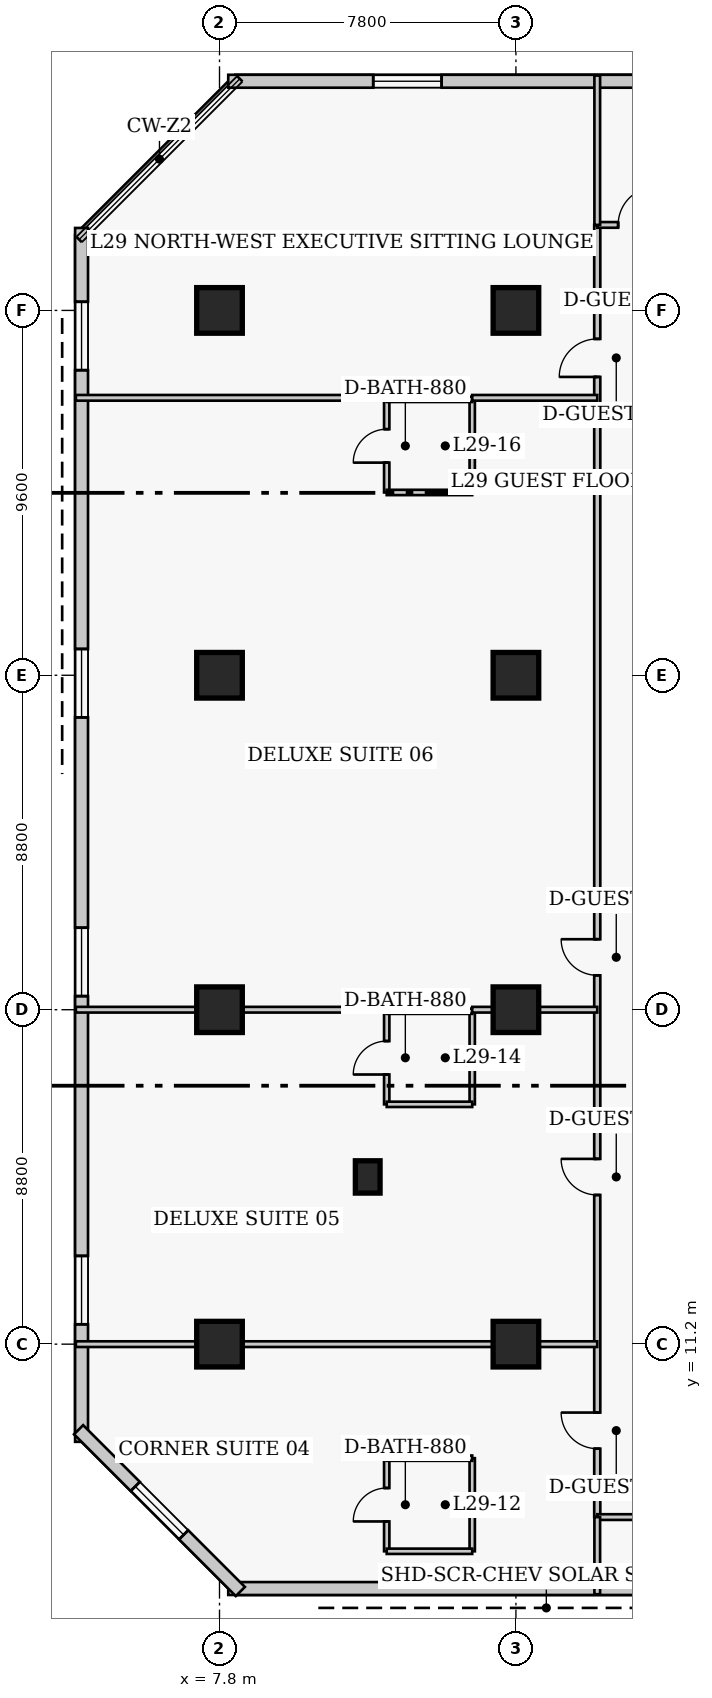
"""IFC4 building model, lengths in metres.
Left out: names, types, materials, properties, quantities, classifications, styles, units other than length and angle.
Written with IfcOpenShell. Run it as: python <this file> out.ifc"""

import sys

from ifc_helpers import new_model, si_unit, direction, frame, frame_2d, origin, origin_2d, place, context, subcontext, project, spatial, rectangle, extrude, element, fill, save


model = new_model("IFC4")
c1 = context("Model", 3, precision=1e-05, world=origin(), true_north=direction((0.0, 1.0)))
c2 = subcontext(c1, "Body", "Model", "MODEL_VIEW")
j1 = project(units=[si_unit("LENGTHUNIT", "METRE"), si_unit("PLANEANGLEUNIT", "RADIAN")], contexts=[c1])
p1 = place(None, origin())
s1 = spatial("IfcSite", under=j1, at=p1, CompositionType="ELEMENT")
p2 = place(p1, origin())
s2 = spatial("IfcBuilding", under=s1, at=p2, CompositionType="ELEMENT")
p3 = place(p2, frame((0.0, 0.0, 118.4)))
s3 = spatial("IfcBuildingStorey", under=s2, at=p3, CompositionType="ELEMENT", Elevation=118.4)
for number, where, z_axis, x_axis in (
    (1, (7.8, 11.2, 0.0), (0.0, 0.0, 1.0), (1.0, 0.0, 0.0)),
    (2, (7.8, 20.0, 0.0), (0.0, 0.0, 1.0), (1.0, 0.0, 0.0)),
    (3, (7.8, 28.8, 0.0), (0.0, 0.0, 1.0), (1.0, 0.0, 0.0)),
    (4, (7.8, 38.4, 0.0), (0.0, 0.0, 1.0), (1.0, 0.0, 0.0)),
    (5, (15.6, 11.2, 0.0), (0.0, 0.0, 1.0), (1.0, 0.0, 0.0)),
    (6, (15.6, 20.0, 0.0), (0.0, 0.0, 1.0), (1.0, 0.0, 0.0)),
    (7, (15.6, 28.8, 0.0), (0.0, 0.0, 1.0), (1.0, 0.0, 0.0)),
    (8, (15.6, 38.4, 0.0), (0.0, 0.0, 1.0), (1.0, 0.0, 0.0)),
):
    element("IfcColumn", number, at=place(p3, frame(where, z_axis=z_axis, x_axis=x_axis)), inside=s3, PredefinedType="COLUMN", context=c2, shape_type="SweptSolid", body=[
        extrude(rectangle(XDim=1.2, YDim=1.2, at=origin_2d()), origin(), (0.0, 0.0, 1.0), 3.8),
    ])
p4 = place(p3, frame((11.7, 15.6, 0.0), z_axis=(0.0, 0.0, 1.0), x_axis=(1.0, 0.0, 0.0)))
e9 = element("IfcColumn", 9, at=p4, inside=s3, PredefinedType="PILASTER", context=c2, shape_type="SweptSolid", body=[
    extrude(rectangle(XDim=0.65, YDim=0.85, at=origin_2d()), origin(), (0.0, 0.0, 1.0), 3.8),
])
p5 = place(p3, frame((8.03, 4.77, 0.0), z_axis=(0.0, 0.0, 1.0), x_axis=(1.0, 0.0, 0.0)))
e10 = element("IfcWall", 10, at=p5, inside=s3, PredefinedType="SOLIDWALL", context=c2, shape_type="SweptSolid", body=[
    extrude(rectangle(XDim=28.29, YDim=0.34, at=frame_2d((14.145, 0.0))), origin(), (0.0, 0.0, 1.0), 3.54),
])
p6 = place(p5, frame((12.595, 0.0, 0.85)))
e11 = element("IfcOpeningElement", 11, at=p6, cuts=e10, PredefinedType="OPENING", context=c2, shape_type="SweptSolid", body=[
    extrude(rectangle(XDim=1.8, YDim=1.8, at=frame_2d((0.9, 0.9))), frame((0.0, 0.18, 0.0), z_axis=(0.0, -1.0, 0.0), x_axis=(1.0, 0.0, 0.0)), (0.0, 0.0, 1.0), 0.36),
])
p7 = place(p3, frame((36.32, 44.43, 0.0), z_axis=(0.0, 0.0, 1.0), x_axis=(-1.0, 0.0, 0.0)))
e12 = element("IfcWall", 12, at=p7, inside=s3, PredefinedType="SOLIDWALL", context=c2, shape_type="SweptSolid", body=[
    extrude(rectangle(XDim=28.29, YDim=0.34, at=frame_2d((14.145, 0.0))), origin(), (0.0, 0.0, 1.0), 3.54),
])
p8 = place(p7, frame((3.815, 0.0, 0.85)))
e13 = element("IfcOpeningElement", 13, at=p8, cuts=e12, PredefinedType="OPENING", context=c2, shape_type="SweptSolid", body=[
    extrude(rectangle(XDim=1.8, YDim=1.8, at=frame_2d((0.9, 0.9))), frame((0.0, 0.18, 0.0), z_axis=(0.0, -1.0, 0.0), x_axis=(1.0, 0.0, 0.0)), (0.0, 0.0, 1.0), 0.36),
])
p9 = place(p7, frame((13.245, 0.0, 0.85)))
e14 = element("IfcOpeningElement", 14, at=p9, cuts=e12, PredefinedType="OPENING", context=c2, shape_type="SweptSolid", body=[
    extrude(rectangle(XDim=1.8, YDim=1.8, at=frame_2d((0.9, 0.9))), frame((0.0, 0.18, 0.0), z_axis=(0.0, -1.0, 0.0), x_axis=(1.0, 0.0, 0.0)), (0.0, 0.0, 1.0), 0.36),
])
p10 = place(p7, frame((22.675, 0.0, 0.85)))
e15 = element("IfcOpeningElement", 15, at=p10, cuts=e12, PredefinedType="OPENING", context=c2, shape_type="SweptSolid", body=[
    extrude(rectangle(XDim=1.8, YDim=1.8, at=frame_2d((0.9, 0.9))), frame((0.0, 0.18, 0.0), z_axis=(0.0, -1.0, 0.0), x_axis=(1.0, 0.0, 0.0)), (0.0, 0.0, 1.0), 0.36),
])
p11 = place(p3, frame((4.17, 40.57, 0.0), z_axis=(0.0, 0.0, 1.0), x_axis=(0.0, -1.0, 0.0)))
e16 = element("IfcWall", 16, at=p11, inside=s3, PredefinedType="SOLIDWALL", context=c2, shape_type="SweptSolid", body=[
    extrude(rectangle(XDim=31.94, YDim=0.34, at=frame_2d((15.97, 0.0))), origin(), (0.0, 0.0, 1.0), 3.54),
])
p12 = place(p11, frame((1.942, 0.0, 0.85)))
e17 = element("IfcOpeningElement", 17, at=p12, cuts=e16, PredefinedType="OPENING", context=c2, shape_type="SweptSolid", body=[
    extrude(rectangle(XDim=1.8, YDim=1.8, at=frame_2d((0.9, 0.9))), frame((0.0, 0.18, 0.0), z_axis=(0.0, -1.0, 0.0), x_axis=(1.0, 0.0, 0.0)), (0.0, 0.0, 1.0), 0.36),
])
p13 = place(p11, frame((11.077, 0.0, 0.85)))
e18 = element("IfcOpeningElement", 18, at=p13, cuts=e16, PredefinedType="OPENING", context=c2, shape_type="SweptSolid", body=[
    extrude(rectangle(XDim=1.8, YDim=1.8, at=frame_2d((0.9, 0.9))), frame((0.0, 0.18, 0.0), z_axis=(0.0, -1.0, 0.0), x_axis=(1.0, 0.0, 0.0)), (0.0, 0.0, 1.0), 0.36),
])
p14 = place(p11, frame((18.413, 0.0, 0.85)))
e19 = element("IfcOpeningElement", 19, at=p14, cuts=e16, PredefinedType="OPENING", context=c2, shape_type="SweptSolid", body=[
    extrude(rectangle(XDim=1.8, YDim=1.8, at=frame_2d((0.9, 0.9))), frame((0.0, 0.18, 0.0), z_axis=(0.0, -1.0, 0.0), x_axis=(1.0, 0.0, 0.0)), (0.0, 0.0, 1.0), 0.36),
])
p15 = place(p11, frame((27.048, 0.0, 0.85)))
e20 = element("IfcOpeningElement", 20, at=p15, cuts=e16, PredefinedType="OPENING", context=c2, shape_type="SweptSolid", body=[
    extrude(rectangle(XDim=1.8, YDim=1.8, at=frame_2d((0.9, 0.9))), frame((0.0, 0.18, 0.0), z_axis=(0.0, -1.0, 0.0), x_axis=(1.0, 0.0, 0.0)), (0.0, 0.0, 1.0), 0.36),
])
p16 = place(p3, frame((4.092, 8.948, 0.0), z_axis=(0.0, 0.0, 1.0), x_axis=(0.707106781187, -0.707106781187, 0.0)))
e21 = element("IfcWall", 21, at=p16, inside=s3, PredefinedType="SOLIDWALL", context=c2, shape_type="SweptSolid", body=[
    extrude(rectangle(XDim=6.02, YDim=0.34, at=frame_2d((3.01, 0.0))), origin(), (0.0, 0.0, 1.0), 3.54),
])
p17 = place(p16, frame((2.11, 0.0, 0.85)))
e22 = element("IfcOpeningElement", 22, at=p17, cuts=e21, PredefinedType="OPENING", context=c2, shape_type="SweptSolid", body=[
    extrude(rectangle(XDim=1.8, YDim=1.8, at=frame_2d((0.9, 0.9))), frame((0.0, 0.18, 0.0), z_axis=(0.0, -1.0, 0.0), x_axis=(1.0, 0.0, 0.0)), (0.0, 0.0, 1.0), 0.36),
])
p18 = place(p3, frame((17.74, 6.65, 0.0), z_axis=(0.0, 0.0, 1.0), x_axis=(0.0, 1.0, 0.0)))
e23 = element("IfcWall", 23, at=p18, inside=s3, PredefinedType="PARTITIONING", context=c2, shape_type="SweptSolid", body=[
    extrude(rectangle(XDim=34.0, YDim=0.16, at=frame_2d((17.0, 0.0))), origin(), (0.0, 0.0, 1.0), 3.54),
])
p19 = place(p18, frame((1.8, 0.0, 0.0)))
e24 = element("IfcOpeningElement", 24, at=p19, cuts=e23, PredefinedType="OPENING", context=c2, shape_type="SweptSolid", body=[
    extrude(rectangle(XDim=0.95, YDim=2.1, at=frame_2d((0.475, 1.05))), frame((0.0, 0.09, 0.0), z_axis=(0.0, -1.0, 0.0), x_axis=(1.0, 0.0, 0.0)), (0.0, 0.0, 1.0), 0.18),
])
p20 = place(p18, frame((8.475, 0.0, 0.0)))
e25 = element("IfcOpeningElement", 25, at=p20, cuts=e23, PredefinedType="OPENING", context=c2, shape_type="SweptSolid", body=[
    extrude(rectangle(XDim=0.95, YDim=2.1, at=frame_2d((0.475, 1.05))), frame((0.0, 0.09, 0.0), z_axis=(0.0, -1.0, 0.0), x_axis=(1.0, 0.0, 0.0)), (0.0, 0.0, 1.0), 0.18),
])
p21 = place(p18, frame((14.255, 0.0, 0.0)))
e26 = element("IfcOpeningElement", 26, at=p21, cuts=e23, PredefinedType="OPENING", context=c2, shape_type="SweptSolid", body=[
    extrude(rectangle(XDim=0.95, YDim=2.1, at=frame_2d((0.475, 1.05))), frame((0.0, 0.09, 0.0), z_axis=(0.0, -1.0, 0.0), x_axis=(1.0, 0.0, 0.0)), (0.0, 0.0, 1.0), 0.18),
])
p22 = place(p18, frame((30.0, 0.0, 0.0)))
e27 = element("IfcOpeningElement", 27, at=p22, cuts=e23, PredefinedType="OPENING", context=c2, shape_type="SweptSolid", body=[
    extrude(rectangle(XDim=1.0, YDim=2.15, at=frame_2d((0.5, 1.075))), frame((0.0, 0.09, 0.0), z_axis=(0.0, -1.0, 0.0), x_axis=(1.0, 0.0, 0.0)), (0.0, 0.0, 1.0), 0.18),
])
p23 = place(p3, frame((17.74, 6.65, 0.0), z_axis=(0.0, 0.0, 1.0), x_axis=(1.0, 0.0, 0.0)))
e28 = element("IfcWall", 28, at=p23, inside=s3, PredefinedType="PARTITIONING", context=c2, shape_type="SweptSolid", body=[
    extrude(rectangle(XDim=2.22, YDim=0.15, at=frame_2d((1.11, 0.0))), origin(), (0.0, 0.0, 1.0), 3.54),
])
p24 = place(p3, frame((17.74, 40.65, 0.0), z_axis=(0.0, 0.0, 1.0), x_axis=(1.0, 0.0, 0.0)))
e29 = element("IfcWall", 29, at=p24, inside=s3, PredefinedType="PARTITIONING", context=c2, shape_type="SweptSolid", body=[
    extrude(rectangle(XDim=4.36, YDim=0.15, at=frame_2d((2.18, 0.0))), origin(), (0.0, 0.0, 1.0), 3.54),
])
p25 = place(p24, frame((0.55, 0.0, 0.0)))
e30 = element("IfcOpeningElement", 30, at=p25, cuts=e29, PredefinedType="OPENING", context=c2, shape_type="SweptSolid", body=[
    extrude(rectangle(XDim=1.0, YDim=2.15, at=frame_2d((0.5, 1.075))), frame((0.0, 0.085, 0.0), z_axis=(0.0, -1.0, 0.0), x_axis=(1.0, 0.0, 0.0)), (0.0, 0.0, 1.0), 0.17),
])
p26 = place(p3, frame((17.74, 40.65, 0.0), z_axis=(0.0, 0.0, 1.0), x_axis=(0.0, 1.0, 0.0)))
e31 = element("IfcWall", 31, at=p26, inside=s3, PredefinedType="PARTITIONING", context=c2, shape_type="SweptSolid", body=[
    extrude(rectangle(XDim=3.93, YDim=0.15, at=frame_2d((1.965, 0.0))), origin(), (0.0, 0.0, 1.0), 3.54),
])
p27 = place(p3, frame((17.74, 4.62, 0.0), z_axis=(0.0, 0.0, 1.0), x_axis=(0.0, 1.0, 0.0)))
e32 = element("IfcWall", 32, at=p27, inside=s3, PredefinedType="PARTITIONING", context=c2, shape_type="SweptSolid", body=[
    extrude(rectangle(XDim=2.03, YDim=0.15, at=frame_2d((1.015, 0.0))), origin(), (0.0, 0.0, 1.0), 3.54),
])
p28 = place(p3, frame((12.2, 5.75, 0.0), z_axis=(0.0, 0.0, 1.0), x_axis=(0.0, 1.0, 0.0)))
e33 = element("IfcWall", 33, at=p28, inside=s3, PredefinedType="PLUMBINGWALL", context=c2, shape_type="SweptSolid", body=[
    extrude(rectangle(XDim=2.45, YDim=0.14, at=frame_2d((1.225, 0.0))), origin(), (0.0, 0.0, 1.0), 3.54),
])
p29 = place(p28, frame((0.785, 0.0, 0.0)))
e34 = element("IfcOpeningElement", 34, at=p29, cuts=e33, PredefinedType="OPENING", context=c2, shape_type="SweptSolid", body=[
    extrude(rectangle(XDim=0.88, YDim=2.05, at=frame_2d((0.44, 1.025))), frame((0.0, 0.08, 0.0), z_axis=(0.0, -1.0, 0.0), x_axis=(1.0, 0.0, 0.0)), (0.0, 0.0, 1.0), 0.16),
])
p30 = place(p3, frame((14.45, 5.75, 0.0), z_axis=(0.0, 0.0, 1.0), x_axis=(0.0, 1.0, 0.0)))
e35 = element("IfcWall", 35, at=p30, inside=s3, PredefinedType="PLUMBINGWALL", context=c2, shape_type="SweptSolid", body=[
    extrude(rectangle(XDim=2.45, YDim=0.14, at=frame_2d((1.225, 0.0))), origin(), (0.0, 0.0, 1.0), 3.54),
])
for number, where, z_axis, x_axis in (
    (36, (12.2, 5.75, 0.0), (0.0, 0.0, 1.0), (1.0, 0.0, 0.0)),
    (37, (12.2, 8.2, 0.0), (0.0, 0.0, 1.0), (1.0, 0.0, 0.0)),
):
    element("IfcWall", number, at=place(p3, frame(where, z_axis=z_axis, x_axis=x_axis)), inside=s3, PredefinedType="PLUMBINGWALL", context=c2, shape_type="SweptSolid", body=[
        extrude(rectangle(XDim=2.25, YDim=0.14, at=frame_2d((1.125, 0.0))), origin(), (0.0, 0.0, 1.0), 3.54),
    ])
p31 = place(p3, frame((4.02, 11.2, 0.0), z_axis=(0.0, 0.0, 1.0), x_axis=(1.0, 0.0, 0.0)))
e38 = element("IfcWall", 38, at=p31, inside=s3, PredefinedType="PARTITIONING", context=c2, shape_type="SweptSolid", body=[
    extrude(rectangle(XDim=13.72, YDim=0.15, at=frame_2d((6.86, 0.0))), origin(), (0.0, 0.0, 1.0), 2.679),
])
p32 = place(p3, frame((12.2, 17.51, 0.0), z_axis=(0.0, 0.0, 1.0), x_axis=(0.0, 1.0, 0.0)))
e39 = element("IfcWall", 39, at=p32, inside=s3, PredefinedType="PLUMBINGWALL", context=c2, shape_type="SweptSolid", body=[
    extrude(rectangle(XDim=2.45, YDim=0.14, at=frame_2d((1.225, 0.0))), origin(), (0.0, 0.0, 1.0), 3.54),
])
p33 = place(p32, frame((0.785, 0.0, 0.0)))
e40 = element("IfcOpeningElement", 40, at=p33, cuts=e39, PredefinedType="OPENING", context=c2, shape_type="SweptSolid", body=[
    extrude(rectangle(XDim=0.88, YDim=2.05, at=frame_2d((0.44, 1.025))), frame((0.0, 0.08, 0.0), z_axis=(0.0, -1.0, 0.0), x_axis=(1.0, 0.0, 0.0)), (0.0, 0.0, 1.0), 0.16),
])
p34 = place(p3, frame((14.45, 17.51, 0.0), z_axis=(0.0, 0.0, 1.0), x_axis=(0.0, 1.0, 0.0)))
e41 = element("IfcWall", 41, at=p34, inside=s3, PredefinedType="PLUMBINGWALL", context=c2, shape_type="SweptSolid", body=[
    extrude(rectangle(XDim=2.45, YDim=0.14, at=frame_2d((1.225, 0.0))), origin(), (0.0, 0.0, 1.0), 3.54),
])
p35 = place(p3, frame((12.2, 17.51, 0.0), z_axis=(0.0, 0.0, 1.0), x_axis=(1.0, 0.0, 0.0)))
e42 = element("IfcWall", 42, at=p35, inside=s3, PredefinedType="PLUMBINGWALL", context=c2, shape_type="SweptSolid", body=[
    extrude(rectangle(XDim=2.25, YDim=0.14, at=frame_2d((1.125, 0.0))), origin(), (0.0, 0.0, 1.0), 3.54),
])
p36 = place(p3, frame((12.2, 19.96, 0.0), z_axis=(0.0, 0.0, 1.0), x_axis=(1.0, 0.0, 0.0)))
e43 = element("IfcWall", 43, at=p36, inside=s3, PredefinedType="PLUMBINGWALL", context=c2, shape_type="SweptSolid", body=[
    extrude(rectangle(XDim=2.25, YDim=0.14, at=frame_2d((1.125, 0.0))), origin(), (0.0, 0.0, 1.0), 2.679),
])
p37 = place(p3, frame((4.02, 20.0, 0.0), z_axis=(0.0, 0.0, 1.0), x_axis=(1.0, 0.0, 0.0)))
e44 = element("IfcWall", 44, at=p37, inside=s3, PredefinedType="PARTITIONING", context=c2, shape_type="SweptSolid", body=[
    extrude(rectangle(XDim=8.18, YDim=0.15, at=frame_2d((4.09, 0.0))), origin(), (0.0, 0.0, 1.0), 2.679),
])
p38 = place(p3, frame((14.45, 20.0, 0.0), z_axis=(0.0, 0.0, 1.0), x_axis=(1.0, 0.0, 0.0)))
e45 = element("IfcWall", 45, at=p38, inside=s3, PredefinedType="PARTITIONING", context=c2, shape_type="SweptSolid", body=[
    extrude(rectangle(XDim=3.29, YDim=0.15, at=frame_2d((1.645, 0.0))), origin(), (0.0, 0.0, 1.0), 2.679),
])
p39 = place(p3, frame((12.2, 33.61, 0.0), z_axis=(0.0, 0.0, 1.0), x_axis=(0.0, 1.0, 0.0)))
e46 = element("IfcWall", 46, at=p39, inside=s3, PredefinedType="PLUMBINGWALL", context=c2, shape_type="SweptSolid", body=[
    extrude(rectangle(XDim=2.45, YDim=0.14, at=frame_2d((1.225, 0.0))), origin(), (0.0, 0.0, 1.0), 3.54),
])
p40 = place(p39, frame((0.785, 0.0, 0.0)))
e47 = element("IfcOpeningElement", 47, at=p40, cuts=e46, PredefinedType="OPENING", context=c2, shape_type="SweptSolid", body=[
    extrude(rectangle(XDim=0.88, YDim=2.05, at=frame_2d((0.44, 1.025))), frame((0.0, 0.08, 0.0), z_axis=(0.0, -1.0, 0.0), x_axis=(1.0, 0.0, 0.0)), (0.0, 0.0, 1.0), 0.16),
])
p41 = place(p3, frame((14.45, 33.61, 0.0), z_axis=(0.0, 0.0, 1.0), x_axis=(0.0, 1.0, 0.0)))
e48 = element("IfcWall", 48, at=p41, inside=s3, PredefinedType="PLUMBINGWALL", context=c2, shape_type="SweptSolid", body=[
    extrude(rectangle(XDim=2.45, YDim=0.14, at=frame_2d((1.225, 0.0))), origin(), (0.0, 0.0, 1.0), 3.54),
])
for number, where, z_axis, x_axis in (
    (49, (12.2, 33.61, 0.0), (0.0, 0.0, 1.0), (1.0, 0.0, 0.0)),
    (50, (12.2, 36.06, 0.0), (0.0, 0.0, 1.0), (1.0, 0.0, 0.0)),
):
    element("IfcWall", number, at=place(p3, frame(where, z_axis=z_axis, x_axis=x_axis)), inside=s3, PredefinedType="PLUMBINGWALL", context=c2, shape_type="SweptSolid", body=[
        extrude(rectangle(XDim=2.25, YDim=0.14, at=frame_2d((1.125, 0.0))), origin(), (0.0, 0.0, 1.0), 3.54),
    ])
p42 = place(p3, frame((4.02, 36.1, 0.0), z_axis=(0.0, 0.0, 1.0), x_axis=(1.0, 0.0, 0.0)))
e51 = element("IfcWall", 51, at=p42, inside=s3, PredefinedType="PARTITIONING", context=c2, shape_type="SweptSolid", body=[
    extrude(rectangle(XDim=8.18, YDim=0.15, at=frame_2d((4.09, 0.0))), origin(), (0.0, 0.0, 1.0), 3.54),
])
p43 = place(p3, frame((14.45, 36.1, 0.0), z_axis=(0.0, 0.0, 1.0), x_axis=(1.0, 0.0, 0.0)))
e52 = element("IfcWall", 52, at=p43, inside=s3, PredefinedType="PARTITIONING", context=c2, shape_type="SweptSolid", body=[
    extrude(rectangle(XDim=3.29, YDim=0.15, at=frame_2d((1.645, 0.0))), origin(), (0.0, 0.0, 1.0), 3.54),
])
p44 = place(p10, origin())
e53 = element("IfcWindow", 53, at=p44, inside=s3, PartitioningType="SINGLE_PANEL", PredefinedType="WINDOW", context=c2, shape_type="SweptSolid", body=[
    extrude(rectangle(XDim=1.8, YDim=1.8, at=frame_2d((0.9, 0.9))), frame((0.0, 0.03, 0.0), z_axis=(0.0, -1.0, 0.0), x_axis=(1.0, 0.0, 0.0)), (0.0, 0.0, 1.0), 0.06),
])
fill(e15, e53)
p45 = place(p12, origin())
e54 = element("IfcWindow", 54, at=p45, inside=s3, PartitioningType="SINGLE_PANEL", PredefinedType="WINDOW", context=c2, shape_type="SweptSolid", body=[
    extrude(rectangle(XDim=1.8, YDim=1.8, at=frame_2d((0.9, 0.9))), frame((0.0, 0.03, 0.0), z_axis=(0.0, -1.0, 0.0), x_axis=(1.0, 0.0, 0.0)), (0.0, 0.0, 1.0), 0.06),
])
fill(e17, e54)
p46 = place(p13, origin())
e55 = element("IfcWindow", 55, at=p46, inside=s3, PartitioningType="SINGLE_PANEL", PredefinedType="WINDOW", context=c2, shape_type="SweptSolid", body=[
    extrude(rectangle(XDim=1.8, YDim=1.8, at=frame_2d((0.9, 0.9))), frame((0.0, 0.03, 0.0), z_axis=(0.0, -1.0, 0.0), x_axis=(1.0, 0.0, 0.0)), (0.0, 0.0, 1.0), 0.06),
])
fill(e18, e55)
p47 = place(p14, origin())
e56 = element("IfcWindow", 56, at=p47, inside=s3, PartitioningType="SINGLE_PANEL", PredefinedType="WINDOW", context=c2, shape_type="SweptSolid", body=[
    extrude(rectangle(XDim=1.8, YDim=1.8, at=frame_2d((0.9, 0.9))), frame((0.0, 0.03, 0.0), z_axis=(0.0, -1.0, 0.0), x_axis=(1.0, 0.0, 0.0)), (0.0, 0.0, 1.0), 0.06),
])
fill(e19, e56)
p48 = place(p15, origin())
e57 = element("IfcWindow", 57, at=p48, inside=s3, PartitioningType="SINGLE_PANEL", PredefinedType="WINDOW", context=c2, shape_type="SweptSolid", body=[
    extrude(rectangle(XDim=1.8, YDim=1.8, at=frame_2d((0.9, 0.9))), frame((0.0, 0.03, 0.0), z_axis=(0.0, -1.0, 0.0), x_axis=(1.0, 0.0, 0.0)), (0.0, 0.0, 1.0), 0.06),
])
fill(e20, e57)
p49 = place(p17, origin())
e58 = element("IfcWindow", 58, at=p49, inside=s3, PartitioningType="SINGLE_PANEL", PredefinedType="WINDOW", context=c2, shape_type="SweptSolid", body=[
    extrude(rectangle(XDim=1.8, YDim=1.8, at=frame_2d((0.9, 0.9))), frame((0.0, 0.03, 0.0), z_axis=(0.0, -1.0, 0.0), x_axis=(1.0, 0.0, 0.0)), (0.0, 0.0, 1.0), 0.06),
])
fill(e22, e58)
p50 = place(p25, origin())
e59 = element("IfcDoor", 59, at=p50, inside=s3, OperationType="SINGLE_SWING_RIGHT", PredefinedType="DOOR", context=c2, shape_type="SweptSolid", body=[
    extrude(rectangle(XDim=1.0, YDim=2.15, at=frame_2d((0.5, 1.075))), frame((0.0, 0.025, 0.0), z_axis=(0.0, -1.0, 0.0), x_axis=(1.0, 0.0, 0.0)), (0.0, 0.0, 1.0), 0.05),
])
fill(e30, e59)
p51 = place(p29, origin())
e60 = element("IfcDoor", 60, at=p51, inside=s3, OperationType="SINGLE_SWING_LEFT", PredefinedType="DOOR", context=c2, shape_type="SweptSolid", body=[
    extrude(rectangle(XDim=0.88, YDim=2.05, at=frame_2d((0.44, 1.025))), frame((0.0, 0.025, 0.0), z_axis=(0.0, -1.0, 0.0), x_axis=(1.0, 0.0, 0.0)), (0.0, 0.0, 1.0), 0.05),
])
fill(e34, e60)
p52 = place(p19, origin())
e61 = element("IfcDoor", 61, at=p52, inside=s3, OperationType="SINGLE_SWING_RIGHT", PredefinedType="DOOR", context=c2, shape_type="SweptSolid", body=[
    extrude(rectangle(XDim=0.95, YDim=2.1, at=frame_2d((0.475, 1.05))), frame((0.0, 0.025, 0.0), z_axis=(0.0, -1.0, 0.0), x_axis=(1.0, 0.0, 0.0)), (0.0, 0.0, 1.0), 0.05),
])
fill(e24, e61)
p53 = place(p33, origin())
e62 = element("IfcDoor", 62, at=p53, inside=s3, OperationType="SINGLE_SWING_LEFT", PredefinedType="DOOR", context=c2, shape_type="SweptSolid", body=[
    extrude(rectangle(XDim=0.88, YDim=2.05, at=frame_2d((0.44, 1.025))), frame((0.0, 0.025, 0.0), z_axis=(0.0, -1.0, 0.0), x_axis=(1.0, 0.0, 0.0)), (0.0, 0.0, 1.0), 0.05),
])
fill(e40, e62)
p54 = place(p20, origin())
e63 = element("IfcDoor", 63, at=p54, inside=s3, OperationType="SINGLE_SWING_RIGHT", PredefinedType="DOOR", context=c2, shape_type="SweptSolid", body=[
    extrude(rectangle(XDim=0.95, YDim=2.1, at=frame_2d((0.475, 1.05))), frame((0.0, 0.025, 0.0), z_axis=(0.0, -1.0, 0.0), x_axis=(1.0, 0.0, 0.0)), (0.0, 0.0, 1.0), 0.05),
])
fill(e25, e63)
p55 = place(p40, origin())
e64 = element("IfcDoor", 64, at=p55, inside=s3, OperationType="SINGLE_SWING_LEFT", PredefinedType="DOOR", context=c2, shape_type="SweptSolid", body=[
    extrude(rectangle(XDim=0.88, YDim=2.05, at=frame_2d((0.44, 1.025))), frame((0.0, 0.025, 0.0), z_axis=(0.0, -1.0, 0.0), x_axis=(1.0, 0.0, 0.0)), (0.0, 0.0, 1.0), 0.05),
])
fill(e47, e64)
p56 = place(p21, origin())
e65 = element("IfcDoor", 65, at=p56, inside=s3, OperationType="SINGLE_SWING_RIGHT", PredefinedType="DOOR", context=c2, shape_type="SweptSolid", body=[
    extrude(rectangle(XDim=0.95, YDim=2.1, at=frame_2d((0.475, 1.05))), frame((0.0, 0.025, 0.0), z_axis=(0.0, -1.0, 0.0), x_axis=(1.0, 0.0, 0.0)), (0.0, 0.0, 1.0), 0.05),
])
fill(e26, e65)
p57 = place(p22, origin())
e66 = element("IfcDoor", 66, at=p57, inside=s3, OperationType="SINGLE_SWING_LEFT", PredefinedType="DOOR", context=c2, shape_type="SweptSolid", body=[
    extrude(rectangle(XDim=1.0, YDim=2.15, at=frame_2d((0.5, 1.075))), frame((0.0, 0.025, 0.0), z_axis=(0.0, -1.0, 0.0), x_axis=(1.0, 0.0, 0.0)), (0.0, 0.0, 1.0), 0.05),
])
fill(e27, e66)
save(model, sys.argv[1])
